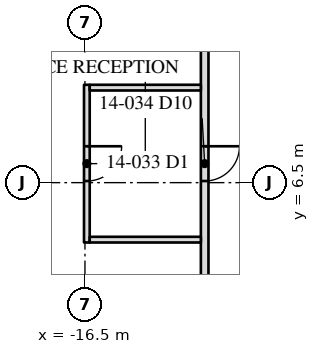
"""IFC4 building model, lengths in metres.
Left out: names, types, materials, properties, quantities, classifications, styles, units other than length and angle.
Written with IfcOpenShell. Run it as: python <this file> out.ifc"""

import sys

from ifc_helpers import new_model, si_unit, direction, frame, frame_2d, origin, place, context, subcontext, project, spatial, rectangle, extrude, element, fill, save


model = new_model("IFC4")
c1 = context("Model", 3, precision=1e-05, world=origin(), true_north=direction((0.0, 1.0)))
c2 = subcontext(c1, "Body", "Model", "MODEL_VIEW")
j1 = project(units=[si_unit("LENGTHUNIT", "METRE"), si_unit("PLANEANGLEUNIT", "RADIAN")], contexts=[c1])
p1 = place(None, origin())
s1 = spatial("IfcSite", under=j1, at=p1, CompositionType="ELEMENT")
p2 = place(p1, origin())
s2 = spatial("IfcBuilding", under=s1, at=p2, CompositionType="ELEMENT")
p3 = place(p2, frame((0.0, 0.0, 61.1)))
s3 = spatial("IfcBuildingStorey", under=s2, at=p3, CompositionType="ELEMENT", Elevation=61.1)
p4 = place(p3, frame((-13.35, 13.45, 0.0), z_axis=(0.0, 0.0, 1.0), x_axis=(0.0, -1.0, 0.0)))
e1 = element("IfcWall", 1, at=p4, inside=s3, PredefinedType="PARTITIONING", context=c2, shape_type="SweptSolid", body=[
    extrude(rectangle(XDim=26.7, YDim=0.2, at=frame_2d((13.35, 0.0))), origin(), (0.0, 0.0, 1.0), 3.91),
])
p5 = place(p4, frame((5.992, 0.0, 0.0)))
e2 = element("IfcOpeningElement", 2, at=p5, cuts=e1, PredefinedType="OPENING", context=c2, shape_type="SweptSolid", body=[
    extrude(rectangle(XDim=0.915, YDim=2.134, at=frame_2d((0.458, 1.067))), frame((0.0, 0.11, 0.0), z_axis=(0.0, -1.0, 0.0), x_axis=(1.0, 0.0, 0.0)), (0.0, 0.0, 1.0), 0.22),
])
p6 = place(p3, frame((-16.45, 9.075, 0.0), z_axis=(0.0, 0.0, 1.0), x_axis=(0.0, -1.0, 0.0)))
e3 = element("IfcWall", 3, at=p6, inside=s3, PredefinedType="PARTITIONING", context=c2, shape_type="SweptSolid", body=[
    extrude(rectangle(XDim=4.15, YDim=0.15, at=frame_2d((2.075, 0.0))), origin(), (0.0, 0.0, 1.0), 3.91),
])
p7 = place(p6, frame((1.617, 0.0, 0.0)))
e4 = element("IfcOpeningElement", 4, at=p7, cuts=e3, PredefinedType="OPENING", context=c2, shape_type="SweptSolid", body=[
    extrude(rectangle(XDim=0.915, YDim=2.134, at=frame_2d((0.458, 1.067))), frame((0.0, 0.085, 0.0), z_axis=(0.0, -1.0, 0.0), x_axis=(1.0, 0.0, 0.0)), (0.0, 0.0, 1.0), 0.17),
])
for number, where, z_axis, x_axis in (
    (5, (-16.375, 9.0, 0.0), (0.0, 0.0, 1.0), (1.0, 0.0, 0.0)),
    (6, (-16.375, 5.0, 0.0), (0.0, 0.0, 1.0), (1.0, 0.0, 0.0)),
):
    element("IfcWall", number, at=place(p3, frame(where, z_axis=z_axis, x_axis=x_axis)), inside=s3, PredefinedType="PARTITIONING", context=c2, shape_type="SweptSolid", body=[
        extrude(rectangle(XDim=2.925, YDim=0.15, at=frame_2d((1.462, 0.0))), origin(), (0.0, 0.0, 1.0), 3.91),
    ])
p8 = place(p7, origin())
e7 = element("IfcDoor", 7, at=p8, inside=s3, OperationType="SINGLE_SWING_LEFT", PredefinedType="DOOR", context=c2, shape_type="SweptSolid", body=[
    extrude(rectangle(XDim=0.915, YDim=2.134, at=frame_2d((0.458, 1.067))), frame((0.0, 0.025, 0.0), z_axis=(0.0, -1.0, 0.0), x_axis=(1.0, 0.0, 0.0)), (0.0, 0.0, 1.0), 0.05),
])
fill(e4, e7)
p9 = place(p5, origin())
e8 = element("IfcDoor", 8, at=p9, inside=s3, OperationType="SINGLE_SWING_LEFT", PredefinedType="DOOR", context=c2, shape_type="SweptSolid", body=[
    extrude(rectangle(XDim=0.915, YDim=2.134, at=frame_2d((0.458, 1.067))), frame((0.0, 0.025, 0.0), z_axis=(0.0, -1.0, 0.0), x_axis=(1.0, 0.0, 0.0)), (0.0, 0.0, 1.0), 0.05),
])
fill(e2, e8)
save(model, sys.argv[1])
